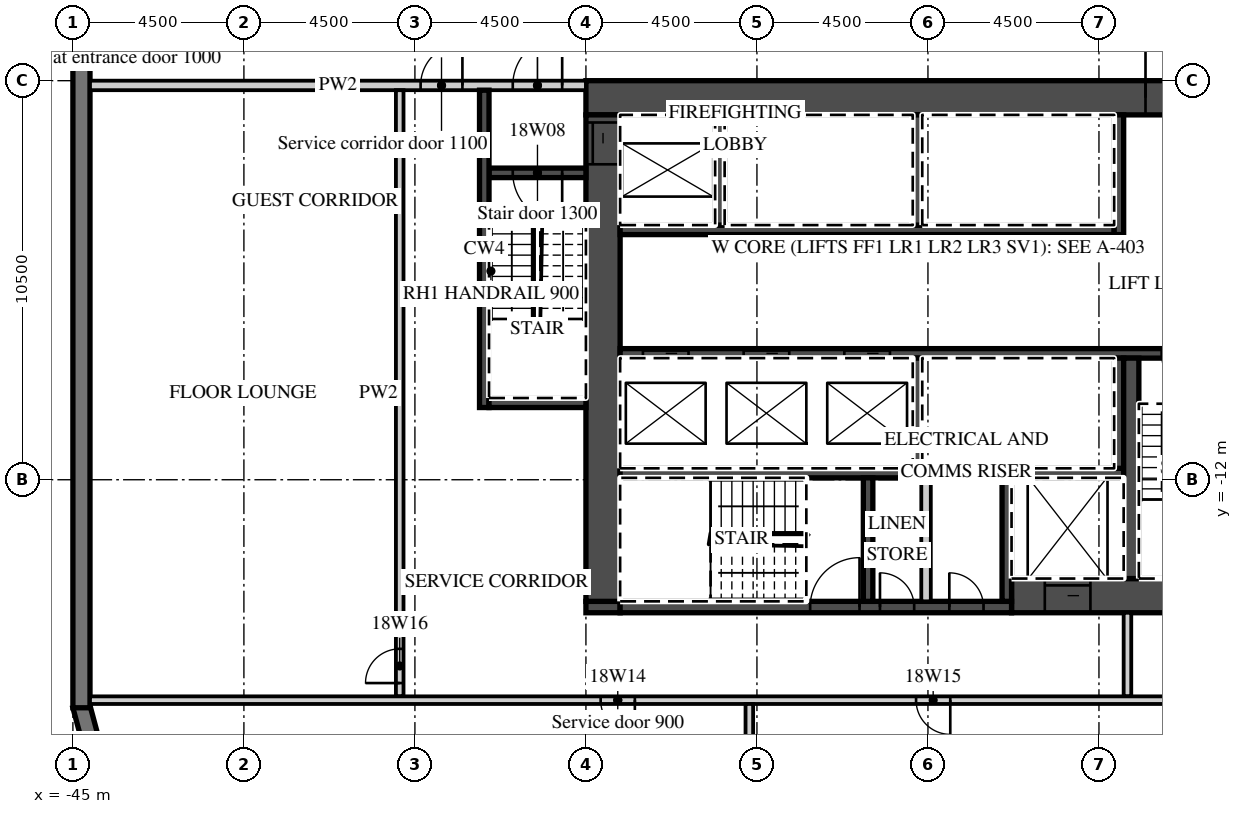
"""IFC4 building model, lengths in metres.
Left out: names, types, materials, properties, quantities, classifications, styles, units other than length and angle.
Written with IfcOpenShell. Run it as: python <this file> out.ifc"""

import sys

from ifc_helpers import new_model, si_unit, direction, frame, frame_2d, origin, place, context, subcontext, project, spatial, polyline, rectangle, outline, extrude, element, fill, save


model = new_model("IFC4")
c1 = context("Model", 3, precision=1e-05, world=origin(), true_north=direction((0.0, 1.0)))
c2 = subcontext(c1, "Body", "Model", "MODEL_VIEW")
j1 = project(units=[si_unit("LENGTHUNIT", "METRE"), si_unit("PLANEANGLEUNIT", "RADIAN")], contexts=[c1])
p1 = place(None, origin())
s1 = spatial("IfcSite", under=j1, at=p1, CompositionType="ELEMENT")
p2 = place(p1, origin())
s2 = spatial("IfcBuilding", under=s1, at=p2, CompositionType="ELEMENT")
p3 = place(p2, frame((0.0, 0.0, 89.7)))
s3 = spatial("IfcBuildingStorey", under=s2, at=p3, CompositionType="ELEMENT", Elevation=89.7)
p4 = place(p3, frame((-44.783, -17.942, 0.0), z_axis=(0.0, 0.0, 1.0), x_axis=(0.25881466832, -0.965926999034, 0.0)))
e1 = element("IfcWall", 1, at=p4, inside=s3, PredefinedType="SOLIDWALL", context=c2, shape_type="SweptSolid", body=[
    extrude(outline(polyline([(0.0, -0.225), (2.071, -0.225), (1.95, 0.225), (0.121, 0.225), (0.0, -0.225)])), origin(), (0.0, 0.0, 1.0), 3.02),
])
p5 = place(p3, frame((-44.775, 18.0, 0.0), z_axis=(0.0, 0.0, 1.0), x_axis=(0.0, -1.0, 0.0)))
e2 = element("IfcWall", 2, at=p5, inside=s3, PredefinedType="SOLIDWALL", context=c2, shape_type="SweptSolid", body=[
    extrude(rectangle(XDim=36.0, YDim=0.45, at=frame_2d((18.0, 0.0))), origin(), (0.0, 0.0, 1.0), 3.02),
])
p6 = place(p5, frame((3.9, 0.0, 0.45)))
e3 = element("IfcOpeningElement", 3, at=p6, cuts=e2, PredefinedType="OPENING", context=c2, shape_type="SweptSolid", body=[
    extrude(rectangle(XDim=3.3, YDim=2.25, at=frame_2d((1.65, 1.125))), frame((0.0, 0.235, 0.0), z_axis=(0.0, -1.0, 0.0), x_axis=(1.0, 0.0, 0.0)), (0.0, 0.0, 1.0), 0.47),
])
p7 = place(p5, frame((8.4, 0.0, 0.45)))
e4 = element("IfcOpeningElement", 4, at=p7, cuts=e2, PredefinedType="OPENING", context=c2, shape_type="SweptSolid", body=[
    extrude(rectangle(XDim=3.3, YDim=2.25, at=frame_2d((1.65, 1.125))), frame((0.0, 0.235, 0.0), z_axis=(0.0, -1.0, 0.0), x_axis=(1.0, 0.0, 0.0)), (0.0, 0.0, 1.0), 0.47),
])
p8 = place(p5, frame((12.9, 0.0, 0.45)))
e5 = element("IfcOpeningElement", 5, at=p8, cuts=e2, PredefinedType="OPENING", context=c2, shape_type="SweptSolid", body=[
    extrude(rectangle(XDim=3.3, YDim=2.25, at=frame_2d((1.65, 1.125))), frame((0.0, 0.235, 0.0), z_axis=(0.0, -1.0, 0.0), x_axis=(1.0, 0.0, 0.0)), (0.0, 0.0, 1.0), 0.47),
])
p9 = place(p3, frame((-31.5, -1.95, 0.0), z_axis=(0.0, 0.0, 1.0), x_axis=(1.0, 0.0, 0.0)))
e6 = element("IfcWall", 6, at=p9, inside=s3, PredefinedType="SHEAR", context=c2, shape_type="SweptSolid", body=[
    extrude(rectangle(XDim=18.0, YDim=0.9, at=frame_2d((9.0, 0.0))), origin(), (0.0, 0.0, 1.0), 3.02),
])
p10 = place(p9, frame((14.725, 0.0, 0.0)))
e7 = element("IfcOpeningElement", 7, at=p10, cuts=e6, PredefinedType="OPENING", context=c2, shape_type="SweptSolid", body=[
    extrude(rectangle(XDim=1.8, YDim=2.1, at=frame_2d((0.9, 1.05))), frame((0.0, 0.46, 0.0), z_axis=(0.0, -1.0, 0.0), x_axis=(1.0, 0.0, 0.0)), (0.0, 0.0, 1.0), 0.92),
])
p11 = place(p3, frame((-20.3, -15.05, 0.0), z_axis=(0.0, 0.0, 1.0), x_axis=(1.0, 0.0, 0.0)))
e8 = element("IfcWall", 8, at=p11, inside=s3, PredefinedType="SHEAR", context=c2, shape_type="SweptSolid", body=[
    extrude(rectangle(XDim=6.8, YDim=0.9, at=frame_2d((3.4, 0.0))), origin(), (0.0, 0.0, 1.0), 3.02),
])
p12 = place(p11, frame((0.875, 0.0, 0.0)))
e9 = element("IfcOpeningElement", 9, at=p12, cuts=e8, PredefinedType="OPENING", context=c2, shape_type="SweptSolid", body=[
    extrude(rectangle(XDim=1.2, YDim=2.1, at=frame_2d((0.6, 1.05))), frame((0.0, 0.46, 0.0), z_axis=(0.0, -1.0, 0.0), x_axis=(1.0, 0.0, 0.0)), (0.0, 0.0, 1.0), 0.92),
])
p13 = place(p3, frame((-31.5, -15.35, 0.0), z_axis=(0.0, 0.0, 1.0), x_axis=(1.0, 0.0, 0.0)))
e10 = element("IfcWall", 10, at=p13, inside=s3, PredefinedType="SHEAR", context=c2, shape_type="SweptSolid", body=[
    extrude(rectangle(XDim=0.9, YDim=0.3, at=frame_2d((0.45, 0.0))), origin(), (0.0, 0.0, 1.0), 3.02),
])
p14 = place(p3, frame((-30.6, -15.35, 0.0), z_axis=(0.0, 0.0, 1.0), x_axis=(1.0, 0.0, 0.0)))
e11 = element("IfcWall", 11, at=p14, inside=s3, PredefinedType="SHEAR", context=c2, shape_type="SweptSolid", body=[
    extrude(rectangle(XDim=10.3, YDim=0.3, at=frame_2d((5.15, 0.0))), origin(), (0.0, 0.0, 1.0), 3.02),
])
p15 = place(p14, frame((5.0, 0.0, 0.0)))
e12 = element("IfcOpeningElement", 12, at=p15, cuts=e11, PredefinedType="OPENING", context=c2, shape_type="SweptSolid", body=[
    extrude(rectangle(XDim=1.3, YDim=2.1, at=frame_2d((0.65, 1.05))), frame((0.0, 0.16, 0.0), z_axis=(0.0, -1.0, 0.0), x_axis=(1.0, 0.0, 0.0)), (0.0, 0.0, 1.0), 0.32),
])
p16 = place(p14, frame((6.837, 0.0, 0.0)))
e13 = element("IfcOpeningElement", 13, at=p16, cuts=e11, PredefinedType="OPENING", context=c2, shape_type="SweptSolid", body=[
    extrude(rectangle(XDim=0.9, YDim=2.1, at=frame_2d((0.45, 1.05))), frame((0.0, 0.16, 0.0), z_axis=(0.0, -1.0, 0.0), x_axis=(1.0, 0.0, 0.0)), (0.0, 0.0, 1.0), 0.32),
])
p17 = place(p14, frame((8.663, 0.0, 0.0)))
e14 = element("IfcOpeningElement", 14, at=p17, cuts=e11, PredefinedType="OPENING", context=c2, shape_type="SweptSolid", body=[
    extrude(rectangle(XDim=0.9, YDim=2.1, at=frame_2d((0.45, 1.05))), frame((0.0, 0.16, 0.0), z_axis=(0.0, -1.0, 0.0), x_axis=(1.0, 0.0, 0.0)), (0.0, 0.0, 1.0), 0.32),
])
p18 = place(p3, frame((-31.05, -15.2, 0.0), z_axis=(0.0, 0.0, 1.0), x_axis=(0.0, 1.0, 0.0)))
e15 = element("IfcWall", 15, at=p18, inside=s3, PredefinedType="SHEAR", context=c2, shape_type="SweptSolid", body=[
    extrude(rectangle(XDim=12.8, YDim=0.9, at=frame_2d((6.4, 0.0))), origin(), (0.0, 0.0, 1.0), 3.02),
])
p19 = place(p18, frame((11.5, 0.0, 0.0)))
e16 = element("IfcOpeningElement", 16, at=p19, cuts=e15, PredefinedType="OPENING", context=c2, shape_type="SweptSolid", body=[
    extrude(rectangle(XDim=1.1, YDim=2.1, at=frame_2d((0.55, 1.05))), frame((0.0, 0.46, 0.0), z_axis=(0.0, -1.0, 0.0), x_axis=(1.0, 0.0, 0.0)), (0.0, 0.0, 1.0), 0.92),
])
p20 = place(p3, frame((-30.6, -5.425, 0.0), z_axis=(0.0, 0.0, 1.0), x_axis=(1.0, 0.0, 0.0)))
e17 = element("IfcWall", 17, at=p20, inside=s3, PredefinedType="SHEAR", context=c2, shape_type="SweptSolid", body=[
    extrude(rectangle(XDim=13.0, YDim=0.25, at=frame_2d((6.5, 0.0))), origin(), (0.0, 0.0, 1.0), 3.02),
])
p21 = place(p3, frame((-17.475, -5.55, 0.0), z_axis=(0.0, 0.0, 1.0), x_axis=(0.0, 1.0, 0.0)))
e18 = element("IfcWall", 18, at=p21, inside=s3, PredefinedType="SHEAR", context=c2, shape_type="SweptSolid", body=[
    extrude(rectangle(XDim=3.15, YDim=0.25, at=frame_2d((1.575, 0.0))), origin(), (0.0, 0.0, 1.0), 3.02),
])
for number, where, z_axis, x_axis in (
    (19, (-27.975, -5.3, 0.0), (0.0, 0.0, 1.0), (0.0, 1.0, 0.0)),
    (20, (-22.775, -5.3, 0.0), (0.0, 0.0, 1.0), (0.0, 1.0, 0.0)),
):
    element("IfcWall", number, at=place(p3, frame(where, z_axis=z_axis, x_axis=x_axis)), inside=s3, PredefinedType="SHEAR", context=c2, shape_type="SweptSolid", body=[
        extrude(rectangle(XDim=2.9, YDim=0.25, at=frame_2d((1.45, 0.0))), origin(), (0.0, 0.0, 1.0), 3.02),
    ])
p22 = place(p3, frame((-30.6, -8.675, 0.0), z_axis=(0.0, 0.0, 1.0), x_axis=(1.0, 0.0, 0.0)))
e21 = element("IfcWall", 21, at=p22, inside=s3, PredefinedType="SHEAR", context=c2, shape_type="SweptSolid", body=[
    extrude(rectangle(XDim=16.2, YDim=0.25, at=frame_2d((8.1, 0.0))), origin(), (0.0, 0.0, 1.0), 3.02),
])
p23 = place(p22, frame((0.6, 0.0, 0.0)))
e22 = element("IfcOpeningElement", 22, at=p23, cuts=e21, PredefinedType="OPENING", context=c2, shape_type="SweptSolid", body=[
    extrude(rectangle(XDim=1.2, YDim=2.1, at=frame_2d((0.6, 1.05))), frame((0.0, 0.135, 0.0), z_axis=(0.0, -1.0, 0.0), x_axis=(1.0, 0.0, 0.0)), (0.0, 0.0, 1.0), 0.27),
])
p24 = place(p22, frame((3.25, 0.0, 0.0)))
e23 = element("IfcOpeningElement", 23, at=p24, cuts=e21, PredefinedType="OPENING", context=c2, shape_type="SweptSolid", body=[
    extrude(rectangle(XDim=1.2, YDim=2.1, at=frame_2d((0.6, 1.05))), frame((0.0, 0.135, 0.0), z_axis=(0.0, -1.0, 0.0), x_axis=(1.0, 0.0, 0.0)), (0.0, 0.0, 1.0), 0.27),
])
p25 = place(p22, frame((5.9, 0.0, 0.0)))
e24 = element("IfcOpeningElement", 24, at=p25, cuts=e21, PredefinedType="OPENING", context=c2, shape_type="SweptSolid", body=[
    extrude(rectangle(XDim=1.2, YDim=2.1, at=frame_2d((0.6, 1.05))), frame((0.0, 0.135, 0.0), z_axis=(0.0, -1.0, 0.0), x_axis=(1.0, 0.0, 0.0)), (0.0, 0.0, 1.0), 0.27),
])
p26 = place(p22, frame((14.25, 0.0, 0.0)))
e25 = element("IfcOpeningElement", 25, at=p26, cuts=e21, PredefinedType="OPENING", context=c2, shape_type="SweptSolid", body=[
    extrude(rectangle(XDim=1.3, YDim=2.1, at=frame_2d((0.65, 1.05))), frame((0.0, 0.135, 0.0), z_axis=(0.0, -1.0, 0.0), x_axis=(1.0, 0.0, 0.0)), (0.0, 0.0, 1.0), 0.27),
])
p27 = place(p3, frame((-30.6, -11.825, 0.0), z_axis=(0.0, 0.0, 1.0), x_axis=(1.0, 0.0, 0.0)))
e26 = element("IfcWall", 26, at=p27, inside=s3, PredefinedType="SHEAR", context=c2, shape_type="SweptSolid", body=[
    extrude(rectangle(XDim=13.25, YDim=0.25, at=frame_2d((6.625, 0.0))), origin(), (0.0, 0.0, 1.0), 3.02),
])
for number, where, z_axis, x_axis in (
    (27, (-17.475, -11.7, 0.0), (0.0, 0.0, 1.0), (0.0, 1.0, 0.0)),
    (28, (-22.775, -11.7, 0.0), (0.0, 0.0, 1.0), (0.0, 1.0, 0.0)),
):
    element("IfcWall", number, at=place(p3, frame(where, z_axis=z_axis, x_axis=x_axis)), inside=s3, PredefinedType="SHEAR", context=c2, shape_type="SweptSolid", body=[
        extrude(rectangle(XDim=2.9, YDim=0.25, at=frame_2d((1.45, 0.0))), origin(), (0.0, 0.0, 1.0), 3.02),
    ])
p28 = place(p3, frame((-17.15, -14.6, 0.0), z_axis=(0.0, 0.0, 1.0), x_axis=(0.0, 1.0, 0.0)))
e29 = element("IfcWall", 29, at=p28, inside=s3, PredefinedType="SHEAR", context=c2, shape_type="SweptSolid", body=[
    extrude(rectangle(XDim=5.8, YDim=0.4, at=frame_2d((2.9, 0.0))), origin(), (0.0, 0.0, 1.0), 3.02),
])
for number, where, z_axis, x_axis in (
    (30, (-20.425, -15.2, 0.0), (0.0, 0.0, 1.0), (0.0, 1.0, 0.0)),
    (31, (-24.075, -15.2, 0.0), (0.0, 0.0, 1.0), (0.0, 1.0, 0.0)),
):
    element("IfcWall", number, at=place(p3, frame(where, z_axis=z_axis, x_axis=x_axis)), inside=s3, PredefinedType="SHEAR", context=c2, shape_type="SweptSolid", body=[
        extrude(rectangle(XDim=3.25, YDim=0.25, at=frame_2d((1.625, 0.0))), origin(), (0.0, 0.0, 1.0), 3.02),
    ])
p29 = place(p3, frame((-22.55, -15.2, 0.0), z_axis=(0.0, 0.0, 1.0), x_axis=(0.0, 1.0, 0.0)))
e32 = element("IfcWall", 32, at=p29, inside=s3, PredefinedType="PARTITIONING", context=c2, shape_type="SweptSolid", body=[
    extrude(rectangle(XDim=3.25, YDim=0.25, at=frame_2d((1.625, 0.0))), origin(), (0.0, 0.0, 1.0), 3.02),
])
p30 = place(p3, frame((-44.55, -1.625, 0.0), z_axis=(0.0, 0.0, 1.0), x_axis=(1.0, 0.0, 0.0)))
e33 = element("IfcWall", 33, at=p30, inside=s3, PredefinedType="PARTITIONING", context=c2, shape_type="SweptSolid", body=[
    extrude(rectangle(XDim=13.05, YDim=0.25, at=frame_2d((6.525, 0.0))), origin(), (0.0, 0.0, 1.0), 3.02),
])
p31 = place(p30, frame((11.125, 0.0, 0.0)))
e34 = element("IfcOpeningElement", 34, at=p31, cuts=e33, PredefinedType="OPENING", context=c2, shape_type="SweptSolid", body=[
    extrude(rectangle(XDim=1.3, YDim=2.1, at=frame_2d((0.65, 1.05))), frame((0.0, 0.135, 0.0), z_axis=(0.0, -1.0, 0.0), x_axis=(1.0, 0.0, 0.0)), (0.0, 0.0, 1.0), 0.27),
])
p32 = place(p30, frame((8.7, 0.0, 0.0)))
e35 = element("IfcOpeningElement", 35, at=p32, cuts=e33, PredefinedType="OPENING", context=c2, shape_type="SweptSolid", body=[
    extrude(rectangle(XDim=1.1, YDim=2.1, at=frame_2d((0.55, 1.05))), frame((0.0, 0.135, 0.0), z_axis=(0.0, -1.0, 0.0), x_axis=(1.0, 0.0, 0.0)), (0.0, 0.0, 1.0), 0.27),
])
p33 = place(p3, frame((-34.05, -3.925, 0.0), z_axis=(0.0, 0.0, 1.0), x_axis=(1.0, 0.0, 0.0)))
e36 = element("IfcWall", 36, at=p33, inside=s3, PredefinedType="SHEAR", context=c2, shape_type="SweptSolid", body=[
    extrude(rectangle(XDim=2.55, YDim=0.25, at=frame_2d((1.275, 0.0))), origin(), (0.0, 0.0, 1.0), 3.02),
])
p34 = place(p33, frame((0.625, 0.0, 0.0)))
e37 = element("IfcOpeningElement", 37, at=p34, cuts=e36, PredefinedType="OPENING", context=c2, shape_type="SweptSolid", body=[
    extrude(rectangle(XDim=1.3, YDim=2.1, at=frame_2d((0.65, 1.05))), frame((0.0, 0.135, 0.0), z_axis=(0.0, -1.0, 0.0), x_axis=(1.0, 0.0, 0.0)), (0.0, 0.0, 1.0), 0.27),
])
p35 = place(p3, frame((-34.175, -10.1, 0.0), z_axis=(0.0, 0.0, 1.0), x_axis=(0.0, 1.0, 0.0)))
e38 = element("IfcWall", 38, at=p35, inside=s3, PredefinedType="SHEAR", context=c2, shape_type="SweptSolid", body=[
    extrude(rectangle(XDim=8.35, YDim=0.25, at=frame_2d((4.175, 0.0))), origin(), (0.0, 0.0, 1.0), 3.02),
])
p36 = place(p3, frame((-34.05, -9.975, 0.0), z_axis=(0.0, 0.0, 1.0), x_axis=(1.0, 0.0, 0.0)))
e39 = element("IfcWall", 39, at=p36, inside=s3, PredefinedType="SHEAR", context=c2, shape_type="SweptSolid", body=[
    extrude(rectangle(XDim=2.55, YDim=0.25, at=frame_2d((1.275, 0.0))), origin(), (0.0, 0.0, 1.0), 3.02),
])
p37 = place(p3, frame((-17.25, -17.7, 0.0), z_axis=(0.0, 0.0, 1.0), x_axis=(0.0, 1.0, 0.0)))
e40 = element("IfcWall", 40, at=p37, inside=s3, PredefinedType="PARTITIONING", context=c2, shape_type="SweptSolid", body=[
    extrude(rectangle(XDim=2.2, YDim=0.2, at=frame_2d((1.1, 0.0))), origin(), (0.0, 0.0, 1.0), 3.02),
])
p38 = place(p3, frame((-36.4, -17.7, 0.0), z_axis=(0.0, 0.0, 1.0), x_axis=(0.0, 1.0, 0.0)))
e41 = element("IfcWall", 41, at=p38, inside=s3, PredefinedType="PARTITIONING", context=c2, shape_type="SweptSolid", body=[
    extrude(rectangle(XDim=15.95, YDim=0.2, at=frame_2d((7.975, 0.0))), origin(), (0.0, 0.0, 1.0), 3.02),
])
p39 = place(p38, frame((0.35, 0.0, 0.0)))
e42 = element("IfcOpeningElement", 42, at=p39, cuts=e41, PredefinedType="OPENING", context=c2, shape_type="SweptSolid", body=[
    extrude(rectangle(XDim=0.9, YDim=2.1, at=frame_2d((0.45, 1.05))), frame((0.0, 0.11, 0.0), z_axis=(0.0, -1.0, 0.0), x_axis=(1.0, 0.0, 0.0)), (0.0, 0.0, 1.0), 0.22),
])
p40 = place(p3, frame((-44.55, -17.8, 0.0), z_axis=(0.0, 0.0, 1.0), x_axis=(1.0, 0.0, 0.0)))
e43 = element("IfcWall", 43, at=p40, inside=s3, PredefinedType="PARTITIONING", context=c2, shape_type="SweptSolid", body=[
    extrude(rectangle(XDim=30.95, YDim=0.2, at=frame_2d((15.475, 0.0))), origin(), (0.0, 0.0, 1.0), 3.02),
])
p41 = place(p40, frame((13.438, 0.0, 0.0)))
e44 = element("IfcOpeningElement", 44, at=p41, cuts=e43, PredefinedType="OPENING", context=c2, shape_type="SweptSolid", body=[
    extrude(rectangle(XDim=0.9, YDim=2.1, at=frame_2d((0.45, 1.05))), frame((0.0, 0.11, 0.0), z_axis=(0.0, -1.0, 0.0), x_axis=(1.0, 0.0, 0.0)), (0.0, 0.0, 1.0), 0.22),
])
p42 = place(p40, frame((21.738, 0.0, 0.0)))
e45 = element("IfcOpeningElement", 45, at=p42, cuts=e43, PredefinedType="OPENING", context=c2, shape_type="SweptSolid", body=[
    extrude(rectangle(XDim=0.9, YDim=2.1, at=frame_2d((0.45, 1.05))), frame((0.0, 0.11, 0.0), z_axis=(0.0, -1.0, 0.0), x_axis=(1.0, 0.0, 0.0)), (0.0, 0.0, 1.0), 0.22),
])
p43 = place(p3, frame((-27.2, -21.55, 0.0), z_axis=(0.0, 0.0, 1.0), x_axis=(0.0, 1.0, 0.0)))
e46 = element("IfcWall", 46, at=p43, inside=s3, PredefinedType="PARTITIONING", context=c2, shape_type="SweptSolid", body=[
    extrude(rectangle(XDim=3.65, YDim=0.2, at=frame_2d((1.825, 0.0))), origin(), (0.0, 0.0, 1.0), 3.02),
])
p44 = place(p23, origin())
e47 = element("IfcDoor", 47, at=p44, inside=s3, OperationType="SLIDING_TO_LEFT", PredefinedType="DOOR", context=c2, shape_type="SweptSolid", body=[
    extrude(rectangle(XDim=1.2, YDim=2.1, at=frame_2d((0.6, 1.05))), frame((0.0, 0.025, 0.0), z_axis=(0.0, -1.0, 0.0), x_axis=(1.0, 0.0, 0.0)), (0.0, 0.0, 1.0), 0.05),
])
fill(e22, e47)
p45 = place(p24, origin())
e48 = element("IfcDoor", 48, at=p45, inside=s3, OperationType="SLIDING_TO_RIGHT", PredefinedType="DOOR", context=c2, shape_type="SweptSolid", body=[
    extrude(rectangle(XDim=1.2, YDim=2.1, at=frame_2d((0.6, 1.05))), frame((0.0, 0.025, 0.0), z_axis=(0.0, -1.0, 0.0), x_axis=(1.0, 0.0, 0.0)), (0.0, 0.0, 1.0), 0.05),
])
fill(e23, e48)
p46 = place(p25, origin())
e49 = element("IfcDoor", 49, at=p46, inside=s3, OperationType="SLIDING_TO_RIGHT", PredefinedType="DOOR", context=c2, shape_type="SweptSolid", body=[
    extrude(rectangle(XDim=1.2, YDim=2.1, at=frame_2d((0.6, 1.05))), frame((0.0, 0.025, 0.0), z_axis=(0.0, -1.0, 0.0), x_axis=(1.0, 0.0, 0.0)), (0.0, 0.0, 1.0), 0.05),
])
fill(e24, e49)
p47 = place(p12, origin())
e50 = element("IfcDoor", 50, at=p47, inside=s3, OperationType="SLIDING_TO_LEFT", PredefinedType="DOOR", context=c2, shape_type="SweptSolid", body=[
    extrude(rectangle(XDim=1.2, YDim=2.1, at=frame_2d((0.6, 1.05))), frame((0.0, 0.025, 0.0), z_axis=(0.0, -1.0, 0.0), x_axis=(1.0, 0.0, 0.0)), (0.0, 0.0, 1.0), 0.05),
])
fill(e9, e50)
p48 = place(p19, origin())
e51 = element("IfcDoor", 51, at=p48, inside=s3, OperationType="SLIDING_TO_RIGHT", PredefinedType="DOOR", context=c2, shape_type="SweptSolid", body=[
    extrude(rectangle(XDim=1.1, YDim=2.1, at=frame_2d((0.55, 1.05))), frame((0.0, 0.025, 0.0), z_axis=(0.0, -1.0, 0.0), x_axis=(1.0, 0.0, 0.0)), (0.0, 0.0, 1.0), 0.05),
])
fill(e16, e51)
p49 = place(p10, origin())
e52 = element("IfcDoor", 52, at=p49, inside=s3, OperationType="DOUBLE_DOOR_DOUBLE_SWING", PredefinedType="DOOR", context=c2, shape_type="SweptSolid", body=[
    extrude(rectangle(XDim=1.8, YDim=2.1, at=frame_2d((0.9, 1.05))), frame((0.0, 0.025, 0.0), z_axis=(0.0, -1.0, 0.0), x_axis=(1.0, 0.0, 0.0)), (0.0, 0.0, 1.0), 0.05),
])
fill(e7, e52)
p50 = place(p31, origin())
e53 = element("IfcDoor", 53, at=p50, inside=s3, OperationType="SINGLE_SWING_RIGHT", PredefinedType="DOOR", context=c2, shape_type="SweptSolid", body=[
    extrude(rectangle(XDim=1.3, YDim=2.1, at=frame_2d((0.65, 1.05))), frame((0.0, 0.025, 0.0), z_axis=(0.0, -1.0, 0.0), x_axis=(1.0, 0.0, 0.0)), (0.0, 0.0, 1.0), 0.05),
])
fill(e34, e53)
p51 = place(p34, origin())
e54 = element("IfcDoor", 54, at=p51, inside=s3, OperationType="SINGLE_SWING_RIGHT", PredefinedType="DOOR", context=c2, shape_type="SweptSolid", body=[
    extrude(rectangle(XDim=1.3, YDim=2.1, at=frame_2d((0.65, 1.05))), frame((0.0, 0.025, 0.0), z_axis=(0.0, -1.0, 0.0), x_axis=(1.0, 0.0, 0.0)), (0.0, 0.0, 1.0), 0.05),
])
fill(e37, e54)
p52 = place(p32, origin())
e55 = element("IfcDoor", 55, at=p52, inside=s3, OperationType="SINGLE_SWING_RIGHT", PredefinedType="DOOR", context=c2, shape_type="SweptSolid", body=[
    extrude(rectangle(XDim=1.1, YDim=2.1, at=frame_2d((0.55, 1.05))), frame((0.0, 0.025, 0.0), z_axis=(0.0, -1.0, 0.0), x_axis=(1.0, 0.0, 0.0)), (0.0, 0.0, 1.0), 0.05),
])
fill(e35, e55)
p53 = place(p26, origin())
e56 = element("IfcDoor", 56, at=p53, inside=s3, OperationType="SINGLE_SWING_RIGHT", PredefinedType="DOOR", context=c2, shape_type="SweptSolid", body=[
    extrude(rectangle(XDim=1.3, YDim=2.1, at=frame_2d((0.65, 1.05))), frame((0.0, 0.025, 0.0), z_axis=(0.0, -1.0, 0.0), x_axis=(1.0, 0.0, 0.0)), (0.0, 0.0, 1.0), 0.05),
])
fill(e25, e56)
p54 = place(p15, origin())
e57 = element("IfcDoor", 57, at=p54, inside=s3, OperationType="SINGLE_SWING_RIGHT", PredefinedType="DOOR", context=c2, shape_type="SweptSolid", body=[
    extrude(rectangle(XDim=1.3, YDim=2.1, at=frame_2d((0.65, 1.05))), frame((0.0, 0.025, 0.0), z_axis=(0.0, -1.0, 0.0), x_axis=(1.0, 0.0, 0.0)), (0.0, 0.0, 1.0), 0.05),
])
fill(e12, e57)
p55 = place(p16, origin())
e58 = element("IfcDoor", 58, at=p55, inside=s3, OperationType="SINGLE_SWING_LEFT", PredefinedType="DOOR", context=c2, shape_type="SweptSolid", body=[
    extrude(rectangle(XDim=0.9, YDim=2.1, at=frame_2d((0.45, 1.05))), frame((0.0, 0.025, 0.0), z_axis=(0.0, -1.0, 0.0), x_axis=(1.0, 0.0, 0.0)), (0.0, 0.0, 1.0), 0.05),
])
fill(e13, e58)
p56 = place(p17, origin())
e59 = element("IfcDoor", 59, at=p56, inside=s3, OperationType="SINGLE_SWING_LEFT", PredefinedType="DOOR", context=c2, shape_type="SweptSolid", body=[
    extrude(rectangle(XDim=0.9, YDim=2.1, at=frame_2d((0.45, 1.05))), frame((0.0, 0.025, 0.0), z_axis=(0.0, -1.0, 0.0), x_axis=(1.0, 0.0, 0.0)), (0.0, 0.0, 1.0), 0.05),
])
fill(e14, e59)
p57 = place(p41, origin())
e60 = element("IfcDoor", 60, at=p57, inside=s3, OperationType="SINGLE_SWING_RIGHT", PredefinedType="DOOR", context=c2, shape_type="SweptSolid", body=[
    extrude(rectangle(XDim=0.9, YDim=2.1, at=frame_2d((0.45, 1.05))), frame((0.0, 0.025, 0.0), z_axis=(0.0, -1.0, 0.0), x_axis=(1.0, 0.0, 0.0)), (0.0, 0.0, 1.0), 0.05),
])
fill(e44, e60)
p58 = place(p42, origin())
e61 = element("IfcDoor", 61, at=p58, inside=s3, OperationType="SINGLE_SWING_RIGHT", PredefinedType="DOOR", context=c2, shape_type="SweptSolid", body=[
    extrude(rectangle(XDim=0.9, YDim=2.1, at=frame_2d((0.45, 1.05))), frame((0.0, 0.025, 0.0), z_axis=(0.0, -1.0, 0.0), x_axis=(1.0, 0.0, 0.0)), (0.0, 0.0, 1.0), 0.05),
])
fill(e45, e61)
p59 = place(p39, origin())
e62 = element("IfcDoor", 62, at=p59, inside=s3, OperationType="SINGLE_SWING_LEFT", PredefinedType="DOOR", context=c2, shape_type="SweptSolid", body=[
    extrude(rectangle(XDim=0.9, YDim=2.1, at=frame_2d((0.45, 1.05))), frame((0.0, 0.025, 0.0), z_axis=(0.0, -1.0, 0.0), x_axis=(1.0, 0.0, 0.0)), (0.0, 0.0, 1.0), 0.05),
])
fill(e42, e62)
save(model, sys.argv[1])
